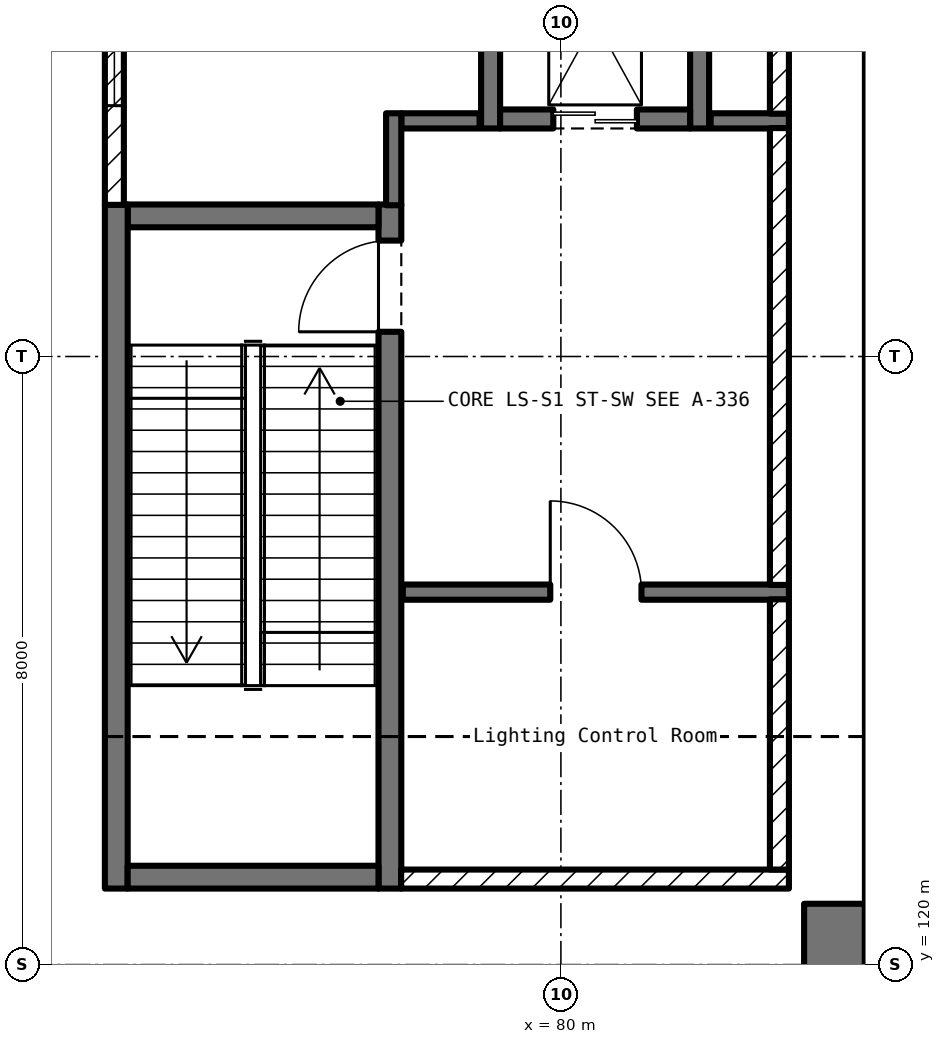
"""IFC4 building model, lengths in metres.
Left out: names, types, materials, properties, quantities, classifications, styles, units other than length and angle.
Written with IfcOpenShell. Run it as: python <this file> out.ifc"""

import sys

from ifc_helpers import new_model, si_unit, direction, frame, frame_2d, origin, place, context, subcontext, project, spatial, rectangle, extrude, element, fill, save


model = new_model("IFC4")
c1 = context("Model", 3, precision=1e-05, world=origin(), true_north=direction((0.0, 1.0)))
c2 = subcontext(c1, "Body", "Model", "MODEL_VIEW")
j1 = project(units=[si_unit("LENGTHUNIT", "METRE"), si_unit("PLANEANGLEUNIT", "RADIAN")], contexts=[c1])
p1 = place(None, origin())
s1 = spatial("IfcSite", under=j1, at=p1, CompositionType="ELEMENT")
p2 = place(p1, origin())
s2 = spatial("IfcBuilding", under=s1, at=p2, CompositionType="ELEMENT")
p3 = place(p2, frame((0.0, 0.0, 28.0)))
s3 = spatial("IfcBuildingStorey", under=s2, at=p3, CompositionType="ELEMENT", Elevation=28.0)
p4 = place(p3, frame((83.6, 95.2, 0.0), z_axis=(0.0, 0.0, 1.0), x_axis=(0.0, 1.0, 0.0)))
e1 = element("IfcWall", 1, at=p4, inside=s3, PredefinedType="SHEAR", context=c2, shape_type="SweptSolid", body=[
    extrude(rectangle(XDim=25.6, YDim=0.8, at=frame_2d((12.8, 0.0))), origin(), (0.0, 0.0, 1.0), 6.0),
])
p5 = place(p4, frame((1.1, 0.0, 2.6)))
e2 = element("IfcOpeningElement", 2, at=p5, cuts=e1, PredefinedType="OPENING", context=c2, shape_type="SweptSolid", body=[
    extrude(rectangle(XDim=2.4, YDim=1.2, at=frame_2d((1.2, 0.6))), frame((0.0, 0.412, 0.0), z_axis=(0.0, -1.0, 0.0), x_axis=(1.0, 0.0, 0.0)), (0.0, 0.0, 1.0), 0.824),
])
p6 = place(p4, frame((4.1, 0.0, 2.6)))
e3 = element("IfcOpeningElement", 3, at=p6, cuts=e1, PredefinedType="OPENING", context=c2, shape_type="SweptSolid", body=[
    extrude(rectangle(XDim=2.4, YDim=1.2, at=frame_2d((1.2, 0.6))), frame((0.0, 0.412, 0.0), z_axis=(0.0, -1.0, 0.0), x_axis=(1.0, 0.0, 0.0)), (0.0, 0.0, 1.0), 0.824),
])
p7 = place(p4, frame((7.1, 0.0, 2.6)))
e4 = element("IfcOpeningElement", 4, at=p7, cuts=e1, PredefinedType="OPENING", context=c2, shape_type="SweptSolid", body=[
    extrude(rectangle(XDim=2.4, YDim=1.2, at=frame_2d((1.2, 0.6))), frame((0.0, 0.412, 0.0), z_axis=(0.0, -1.0, 0.0), x_axis=(1.0, 0.0, 0.0)), (0.0, 0.0, 1.0), 0.824),
])
p8 = place(p4, frame((10.1, 0.0, 2.6)))
e5 = element("IfcOpeningElement", 5, at=p8, cuts=e1, PredefinedType="OPENING", context=c2, shape_type="SweptSolid", body=[
    extrude(rectangle(XDim=2.4, YDim=1.2, at=frame_2d((1.2, 0.6))), frame((0.0, 0.412, 0.0), z_axis=(0.0, -1.0, 0.0), x_axis=(1.0, 0.0, 0.0)), (0.0, 0.0, 1.0), 0.824),
])
p9 = place(p4, frame((13.1, 0.0, 2.6)))
e6 = element("IfcOpeningElement", 6, at=p9, cuts=e1, PredefinedType="OPENING", context=c2, shape_type="SweptSolid", body=[
    extrude(rectangle(XDim=2.4, YDim=1.2, at=frame_2d((1.2, 0.6))), frame((0.0, 0.412, 0.0), z_axis=(0.0, -1.0, 0.0), x_axis=(1.0, 0.0, 0.0)), (0.0, 0.0, 1.0), 0.824),
])
p10 = place(p4, frame((16.1, 0.0, 2.6)))
e7 = element("IfcOpeningElement", 7, at=p10, cuts=e1, PredefinedType="OPENING", context=c2, shape_type="SweptSolid", body=[
    extrude(rectangle(XDim=2.4, YDim=1.2, at=frame_2d((1.2, 0.6))), frame((0.0, 0.412, 0.0), z_axis=(0.0, -1.0, 0.0), x_axis=(1.0, 0.0, 0.0)), (0.0, 0.0, 1.0), 0.824),
])
p11 = place(p4, frame((19.1, 0.0, 2.6)))
e8 = element("IfcOpeningElement", 8, at=p11, cuts=e1, PredefinedType="OPENING", context=c2, shape_type="SweptSolid", body=[
    extrude(rectangle(XDim=2.4, YDim=1.2, at=frame_2d((1.2, 0.6))), frame((0.0, 0.412, 0.0), z_axis=(0.0, -1.0, 0.0), x_axis=(1.0, 0.0, 0.0)), (0.0, 0.0, 1.0), 0.824),
])
p12 = place(p4, frame((22.1, 0.0, 2.6)))
e9 = element("IfcOpeningElement", 9, at=p12, cuts=e1, PredefinedType="OPENING", context=c2, shape_type="SweptSolid", body=[
    extrude(rectangle(XDim=2.4, YDim=1.2, at=frame_2d((1.2, 0.6))), frame((0.0, 0.412, 0.0), z_axis=(0.0, -1.0, 0.0), x_axis=(1.0, 0.0, 0.0)), (0.0, 0.0, 1.0), 0.824),
])
p13 = place(p3, frame((77.75, 121.0, 0.0), z_axis=(0.0, 0.0, 1.0), x_axis=(0.0, 1.0, 0.0)))
e10 = element("IfcWall", 10, at=p13, inside=s3, PredefinedType="SOLIDWALL", context=c2, shape_type="SweptSolid", body=[
    extrude(rectangle(XDim=9.0, YDim=0.3, at=frame_2d((4.5, 0.0))), origin(), (0.0, 0.0, 1.0), 6.0),
])
p14 = place(p13, frame((7.325, 0.0, 0.0)))
e11 = element("IfcOpeningElement", 11, at=p14, cuts=e10, PredefinedType="OPENING", context=c2, shape_type="SweptSolid", body=[
    extrude(rectangle(XDim=1.2, YDim=2.1, at=frame_2d((0.6, 1.05))), frame((0.0, 0.162, 0.0), z_axis=(0.0, -1.0, 0.0), x_axis=(1.0, 0.0, 0.0)), (0.0, 0.0, 1.0), 0.324),
])
p15 = place(p3, frame((77.6, 129.85, 0.0), z_axis=(0.0, 0.0, 1.0), x_axis=(-1.0, 0.0, 0.0)))
e12 = element("IfcWall", 12, at=p15, inside=s3, PredefinedType="SOLIDWALL", context=c2, shape_type="SweptSolid", body=[
    extrude(rectangle(XDim=3.3, YDim=0.3, at=frame_2d((1.65, 0.0))), origin(), (0.0, 0.0, 1.0), 6.0),
])
p16 = place(p3, frame((74.15, 130.0, 0.0), z_axis=(0.0, 0.0, 1.0), x_axis=(0.0, -1.0, 0.0)))
e13 = element("IfcWall", 13, at=p16, inside=s3, PredefinedType="SOLIDWALL", context=c2, shape_type="SweptSolid", body=[
    extrude(rectangle(XDim=9.0, YDim=0.3, at=frame_2d((4.5, 0.0))), origin(), (0.0, 0.0, 1.0), 6.0),
])
p17 = place(p3, frame((74.3, 121.15, 0.0), z_axis=(0.0, 0.0, 1.0), x_axis=(1.0, 0.0, 0.0)))
e14 = element("IfcWall", 14, at=p17, inside=s3, PredefinedType="SOLIDWALL", context=c2, shape_type="SweptSolid", body=[
    extrude(rectangle(XDim=3.3, YDim=0.3, at=frame_2d((1.65, 0.0))), origin(), (0.0, 0.0, 1.0), 6.0),
])
for number, where, z_axis, x_axis in (
    (15, (81.825, 131.0, 0.0), (0.0, 0.0, 1.0), (0.0, 1.0, 0.0)),
    (16, (79.075, 135.0, 0.0), (0.0, 0.0, 1.0), (0.0, -1.0, 0.0)),
):
    element("IfcWall", number, at=place(p3, frame(where, z_axis=z_axis, x_axis=x_axis)), inside=s3, PredefinedType="SOLIDWALL", context=c2, shape_type="SweptSolid", body=[
        extrude(rectangle(XDim=4.0, YDim=0.25, at=frame_2d((2.0, 0.0))), origin(), (0.0, 0.0, 1.0), 6.0),
    ])
p18 = place(p3, frame((79.2, 131.125, 0.0), z_axis=(0.0, 0.0, 1.0), x_axis=(1.0, 0.0, 0.0)))
e17 = element("IfcWall", 17, at=p18, inside=s3, PredefinedType="SOLIDWALL", context=c2, shape_type="SweptSolid", body=[
    extrude(rectangle(XDim=2.5, YDim=0.25, at=frame_2d((1.25, 0.0))), origin(), (0.0, 0.0, 1.0), 6.0),
])
p19 = place(p18, frame((0.7, 0.0, 0.0)))
e18 = element("IfcOpeningElement", 18, at=p19, cuts=e17, PredefinedType="OPENING", context=c2, shape_type="SweptSolid", body=[
    extrude(rectangle(XDim=1.1, YDim=2.1, at=frame_2d((0.55, 1.05))), frame((0.0, 0.137, 0.0), z_axis=(0.0, -1.0, 0.0), x_axis=(1.0, 0.0, 0.0)), (0.0, 0.0, 1.0), 0.274),
])
for number, where, z_axis, x_axis in (
    (19, (83.0, 131.1, 0.0), (0.0, 0.0, 1.0), (-1.0, 0.0, 0.0)),
    (20, (78.93, 131.1, 0.0), (0.0, 0.0, 1.0), (-1.0, 0.0, 0.0)),
):
    element("IfcWall", number, at=place(p3, frame(where, z_axis=z_axis, x_axis=x_axis)), inside=s3, PredefinedType="PARTITIONING", context=c2, shape_type="SweptSolid", body=[
        extrude(rectangle(XDim=1.03, YDim=0.2, at=frame_2d((0.515, 0.0))), origin(), (0.0, 0.0, 1.0), 5.8),
    ])
p20 = place(p3, frame((77.8, 131.2, 0.0), z_axis=(0.0, 0.0, 1.0), x_axis=(0.0, -1.0, 0.0)))
e21 = element("IfcWall", 21, at=p20, inside=s3, PredefinedType="PARTITIONING", context=c2, shape_type="SweptSolid", body=[
    extrude(rectangle(XDim=1.21, YDim=0.2, at=frame_2d((0.605, 0.0))), origin(), (0.0, 0.0, 1.0), 5.8),
])
p21 = place(p3, frame((77.92, 124.9, 0.0), z_axis=(0.0, 0.0, 1.0), x_axis=(1.0, 0.0, 0.0)))
e22 = element("IfcWall", 22, at=p21, inside=s3, PredefinedType="PARTITIONING", context=c2, shape_type="SweptSolid", body=[
    extrude(rectangle(XDim=5.08, YDim=0.2, at=frame_2d((2.54, 0.0))), origin(), (0.0, 0.0, 1.0), 5.8),
])
p22 = place(p21, frame((1.94, 0.0, 0.0)))
e23 = element("IfcOpeningElement", 23, at=p22, cuts=e22, PredefinedType="OPENING", context=c2, shape_type="SweptSolid", body=[
    extrude(rectangle(XDim=1.2, YDim=2.1, at=frame_2d((0.6, 1.05))), frame((0.0, 0.112, 0.0), z_axis=(0.0, -1.0, 0.0), x_axis=(1.0, 0.0, 0.0)), (0.0, 0.0, 1.0), 0.224),
])
p23 = place(p3, frame((84.001, 119.999, 0.0), z_axis=(0.0, 0.0, 1.0), x_axis=(0.707106781187, -0.707106781187, 0.0)))
e24 = element("IfcWall", 24, at=p23, inside=s3, PredefinedType="PARTITIONING", context=c2, shape_type="SweptSolid", body=[
    extrude(rectangle(XDim=2.827, YDim=0.1, at=frame_2d((1.414, 0.0))), origin(), (0.0, 0.0, 1.0), 4.9),
])
p24 = place(p3, frame((74.125, 134.75, 0.0), z_axis=(0.0, 0.0, 1.0), x_axis=(0.0, -1.0, 0.0)))
e25 = element("IfcWall", 25, at=p24, inside=s3, PredefinedType="SOLIDWALL", context=c2, shape_type="SweptSolid", body=[
    extrude(rectangle(XDim=4.755, YDim=0.25, at=frame_2d((2.377, 0.0))), origin(), (0.0, 0.0, 1.0), 5.8),
])
p25 = place(p24, frame((1.05, 0.0, 2.6)))
e26 = element("IfcOpeningElement", 26, at=p25, cuts=e25, PredefinedType="OPENING", context=c2, shape_type="SweptSolid", body=[
    extrude(rectangle(XDim=2.4, YDim=1.2, at=frame_2d((1.2, 0.6))), frame((0.0, 0.137, 0.0), z_axis=(0.0, -1.0, 0.0), x_axis=(1.0, 0.0, 0.0)), (0.0, 0.0, 1.0), 0.274),
])
p26 = place(p3, frame((77.898, 121.125, 0.0), z_axis=(0.0, 0.0, 1.0), x_axis=(1.0, 0.0, 0.0)))
e27 = element("IfcWall", 27, at=p26, inside=s3, PredefinedType="SOLIDWALL", context=c2, shape_type="SweptSolid", body=[
    extrude(rectangle(XDim=5.102, YDim=0.25, at=frame_2d((2.551, 0.0))), origin(), (0.0, 0.0, 1.0), 5.8),
])
p27 = place(p3, frame((82.875, 121.25, 0.0), z_axis=(0.0, 0.0, 1.0), x_axis=(0.0, 1.0, 0.0)))
e28 = element("IfcWall", 28, at=p27, inside=s3, PredefinedType="SOLIDWALL", context=c2, shape_type="SweptSolid", body=[
    extrude(rectangle(XDim=3.555, YDim=0.25, at=frame_2d((1.777, 0.0))), origin(), (0.0, 0.0, 1.0), 5.8),
])
p28 = place(p3, frame((82.875, 124.995, 0.0), z_axis=(0.0, 0.0, 1.0), x_axis=(0.0, 1.0, 0.0)))
e29 = element("IfcWall", 29, at=p28, inside=s3, PredefinedType="SOLIDWALL", context=c2, shape_type="SweptSolid", body=[
    extrude(rectangle(XDim=6.01, YDim=0.25, at=frame_2d((3.005, 0.0))), origin(), (0.0, 0.0, 1.0), 5.8),
])
p29 = place(p3, frame((82.875, 131.195, 0.0), z_axis=(0.0, 0.0, 1.0), x_axis=(0.0, 1.0, 0.0)))
e30 = element("IfcWall", 30, at=p29, inside=s3, PredefinedType="SOLIDWALL", context=c2, shape_type="SweptSolid", body=[
    extrude(rectangle(XDim=3.805, YDim=0.25, at=frame_2d((1.902, 0.0))), origin(), (0.0, 0.0, 1.0), 5.8),
])
p30 = place(p14, origin())
e31 = element("IfcDoor", 31, at=p30, inside=s3, OperationType="SINGLE_SWING_LEFT", PredefinedType="DOOR", context=c2, shape_type="SweptSolid", body=[
    extrude(rectangle(XDim=1.2, YDim=2.1, at=frame_2d((0.6, 1.05))), frame((0.0, 0.025, 0.0), z_axis=(0.0, -1.0, 0.0), x_axis=(1.0, 0.0, 0.0)), (0.0, 0.0, 1.0), 0.05),
])
fill(e11, e31)
p31 = place(p19, origin())
e32 = element("IfcDoor", 32, at=p31, inside=s3, OperationType="DOUBLE_DOOR_SLIDING", PredefinedType="DOOR", context=c2, shape_type="SweptSolid", body=[
    extrude(rectangle(XDim=1.1, YDim=2.1, at=frame_2d((0.55, 1.05))), frame((0.0, 0.025, 0.0), z_axis=(0.0, -1.0, 0.0), x_axis=(1.0, 0.0, 0.0)), (0.0, 0.0, 1.0), 0.05),
])
fill(e18, e32)
p32 = place(p22, origin())
e33 = element("IfcDoor", 33, at=p32, inside=s3, OperationType="SINGLE_SWING_LEFT", PredefinedType="DOOR", context=c2, shape_type="SweptSolid", body=[
    extrude(rectangle(XDim=1.2, YDim=2.1, at=frame_2d((0.6, 1.05))), frame((0.0, 0.025, 0.0), z_axis=(0.0, -1.0, 0.0), x_axis=(1.0, 0.0, 0.0)), (0.0, 0.0, 1.0), 0.05),
])
fill(e23, e33)
p33 = place(p25, origin())
e34 = element("IfcWindow", 34, at=p33, inside=s3, PartitioningType="SINGLE_PANEL", PredefinedType="WINDOW", context=c2, shape_type="SweptSolid", body=[
    extrude(rectangle(XDim=2.4, YDim=1.2, at=frame_2d((1.2, 0.6))), frame((0.0, 0.03, 0.0), z_axis=(0.0, -1.0, 0.0), x_axis=(1.0, 0.0, 0.0)), (0.0, 0.0, 1.0), 0.06),
])
fill(e26, e34)
save(model, sys.argv[1])
